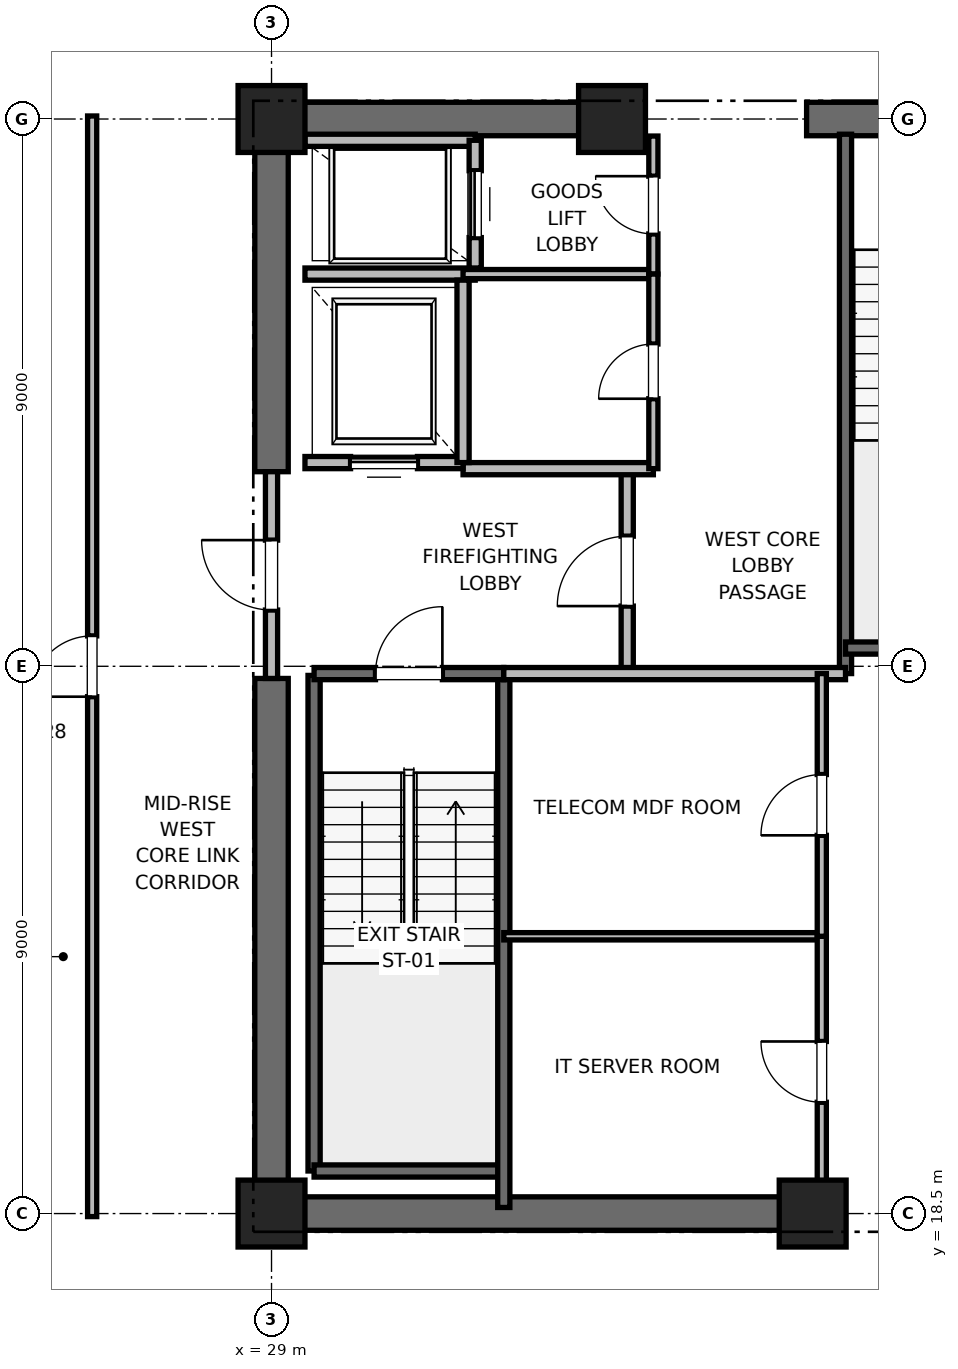
"""IFC4 building model, lengths in metres.
Left out: names, types, materials, properties, quantities, classifications, styles, units other than length and angle.
Written with IfcOpenShell. Run it as: python <this file> out.ifc"""

import sys

from ifc_helpers import new_model, si_unit, direction, frame, frame_2d, origin, origin_2d, place, context, subcontext, project, spatial, rectangle, extrude, element, fill, save


model = new_model("IFC4")
c1 = context("Model", 3, precision=1e-05, world=origin(), true_north=direction((0.0, 1.0)))
c2 = subcontext(c1, "Body", "Model", "MODEL_VIEW")
j1 = project(units=[si_unit("LENGTHUNIT", "METRE"), si_unit("PLANEANGLEUNIT", "RADIAN")], contexts=[c1])
p1 = place(None, origin())
s1 = spatial("IfcSite", under=j1, at=p1, CompositionType="ELEMENT")
p2 = place(p1, origin())
s2 = spatial("IfcBuilding", under=s1, at=p2, CompositionType="ELEMENT")
p3 = place(p2, frame((0.0, 0.0, 144.4)))
s3 = spatial("IfcBuildingStorey", under=s2, at=p3, CompositionType="ELEMENT", Elevation=144.4)
for number, where, z_axis, x_axis in (
    (1, (29.0, 18.5, 0.0), (0.0, 0.0, 1.0), (1.0, 0.0, 0.0)),
    (2, (29.0, 36.5, 0.0), (0.0, 0.0, 1.0), (1.0, 0.0, 0.0)),
    (3, (37.9, 18.5, 0.0), (0.0, 0.0, 1.0), (1.0, 0.0, 0.0)),
    (4, (34.6, 36.5, 0.0), (0.0, 0.0, 1.0), (1.0, 0.0, 0.0)),
):
    element("IfcColumn", number, at=place(p3, frame(where, z_axis=z_axis, x_axis=x_axis)), inside=s3, PredefinedType="PILASTER", context=c2, shape_type="SweptSolid", body=[
        extrude(rectangle(XDim=1.1, YDim=1.1, at=origin_2d()), origin(), (0.0, 0.0, 1.0), 4.0),
    ])
p4 = place(p3, frame((29.0, 18.5, 0.0), z_axis=(0.0, 0.0, 1.0), x_axis=(1.0, 0.0, 0.0)))
e5 = element("IfcWall", 5, at=p4, inside=s3, PredefinedType="SHEAR", context=c2, shape_type="SweptSolid", body=[
    extrude(rectangle(XDim=9.2, YDim=0.55, at=frame_2d((4.6, 0.0))), origin(), (0.0, 0.0, 1.0), 3.775),
])
p5 = place(p3, frame((29.0, 36.5, 0.0), z_axis=(0.0, 0.0, 1.0), x_axis=(1.0, 0.0, 0.0)))
e6 = element("IfcWall", 6, at=p5, inside=s3, PredefinedType="SHEAR", context=c2, shape_type="SweptSolid", body=[
    extrude(rectangle(XDim=5.8, YDim=0.55, at=frame_2d((2.9, 0.0))), origin(), (0.0, 0.0, 1.0), 3.775),
])
p6 = place(p3, frame((37.8, 36.5, 0.0), z_axis=(0.0, 0.0, 1.0), x_axis=(1.0, 0.0, 0.0)))
e7 = element("IfcWall", 7, at=p6, inside=s3, PredefinedType="SHEAR", context=c2, shape_type="SweptSolid", body=[
    extrude(rectangle(XDim=4.4, YDim=0.55, at=frame_2d((2.2, 0.0))), origin(), (0.0, 0.0, 1.0), 3.775),
])
p7 = place(p6, frame((1.65, 0.0, 0.0)))
e8 = element("IfcOpeningElement", 8, at=p7, cuts=e7, PredefinedType="OPENING", context=c2, shape_type="SweptSolid", body=[
    extrude(rectangle(XDim=1.1, YDim=2.15, at=frame_2d((0.55, 1.075))), frame((0.0, 0.275, 0.0), z_axis=(0.0, -1.0, 0.0), x_axis=(1.0, 0.0, 0.0)), (0.0, 0.0, 1.0), 0.55),
])
p8 = place(p3, frame((29.0, 18.5, 0.0), z_axis=(0.0, 0.0, 1.0), x_axis=(0.0, 1.0, 0.0)))
e9 = element("IfcWall", 9, at=p8, inside=s3, PredefinedType="SHEAR", context=c2, shape_type="SweptSolid", body=[
    extrude(rectangle(XDim=8.8, YDim=0.55, at=frame_2d((4.4, 0.0))), origin(), (0.0, 0.0, 1.0), 3.775),
])
p9 = place(p3, frame((29.0, 30.7, 0.0), z_axis=(0.0, 0.0, 1.0), x_axis=(0.0, 1.0, 0.0)))
e10 = element("IfcWall", 10, at=p9, inside=s3, PredefinedType="SHEAR", context=c2, shape_type="SweptSolid", body=[
    extrude(rectangle(XDim=5.8, YDim=0.55, at=frame_2d((2.9, 0.0))), origin(), (0.0, 0.0, 1.0), 3.775),
])
p10 = place(p3, frame((29.7, 19.2, 0.0), z_axis=(0.0, 0.0, 1.0), x_axis=(0.0, 1.0, 0.0)))
e11 = element("IfcWall", 11, at=p10, inside=s3, PredefinedType="SOLIDWALL", context=c2, shape_type="SweptSolid", body=[
    extrude(rectangle(XDim=8.15, YDim=0.2, at=frame_2d((4.075, 0.0))), origin(), (0.0, 0.0, 1.0), 3.775),
])
p11 = place(p3, frame((29.7, 19.2, 0.0), z_axis=(0.0, 0.0, 1.0), x_axis=(1.0, 0.0, 0.0)))
e12 = element("IfcWall", 12, at=p11, inside=s3, PredefinedType="SOLIDWALL", context=c2, shape_type="SweptSolid", body=[
    extrude(rectangle(XDim=3.12, YDim=0.2, at=frame_2d((1.56, 0.0))), origin(), (0.0, 0.0, 1.0), 3.775),
])
p12 = place(p3, frame((32.82, 18.6, 0.0), z_axis=(0.0, 0.0, 1.0), x_axis=(0.0, 1.0, 0.0)))
e13 = element("IfcWall", 13, at=p12, inside=s3, PredefinedType="SOLIDWALL", context=c2, shape_type="SweptSolid", body=[
    extrude(rectangle(XDim=8.78, YDim=0.2, at=frame_2d((4.39, 0.0))), origin(), (0.0, 0.0, 1.0), 3.775),
])
p13 = place(p3, frame((29.7, 27.38, 0.0), z_axis=(0.0, 0.0, 1.0), x_axis=(1.0, 0.0, 0.0)))
e14 = element("IfcWall", 14, at=p13, inside=s3, PredefinedType="SOLIDWALL", context=c2, shape_type="SweptSolid", body=[
    extrude(rectangle(XDim=3.12, YDim=0.2, at=frame_2d((1.56, 0.0))), origin(), (0.0, 0.0, 1.0), 3.775),
])
p14 = place(p13, frame((1.01, 0.0, 0.0)))
e15 = element("IfcOpeningElement", 15, at=p14, cuts=e14, PredefinedType="OPENING", context=c2, shape_type="SweptSolid", body=[
    extrude(rectangle(XDim=1.1, YDim=2.15, at=frame_2d((0.55, 1.075))), frame((0.0, 0.1, 0.0), z_axis=(0.0, -1.0, 0.0), x_axis=(1.0, 0.0, 0.0)), (0.0, 0.0, 1.0), 0.2),
])
p15 = place(p3, frame((38.44, 27.38, 0.0), z_axis=(0.0, 0.0, 1.0), x_axis=(0.0, 1.0, 0.0)))
e16 = element("IfcWall", 16, at=p15, inside=s3, PredefinedType="SOLIDWALL", context=c2, shape_type="SweptSolid", body=[
    extrude(rectangle(XDim=8.87, YDim=0.2, at=frame_2d((4.435, 0.0))), origin(), (0.0, 0.0, 1.0), 3.775),
])
p16 = place(p3, frame((38.44, 27.8, 0.0), z_axis=(0.0, 0.0, 1.0), x_axis=(1.0, 0.0, 0.0)))
e17 = element("IfcWall", 17, at=p16, inside=s3, PredefinedType="SOLIDWALL", context=c2, shape_type="SweptSolid", body=[
    extrude(rectangle(XDim=3.32, YDim=0.2, at=frame_2d((1.66, 0.0))), origin(), (0.0, 0.0, 1.0), 3.775),
])
p17 = place(p3, frame((34.85, 27.38, 0.0), z_axis=(0.0, 0.0, 1.0), x_axis=(0.0, 1.0, 0.0)))
e18 = element("IfcWall", 18, at=p17, inside=s3, PredefinedType="PARTITIONING", context=c2, shape_type="SweptSolid", body=[
    extrude(rectangle(XDim=3.37, YDim=0.2, at=frame_2d((1.685, 0.0))), origin(), (0.0, 0.0, 1.0), 3.775),
])
p18 = place(p17, frame((1.11, 0.0, 0.0)))
e19 = element("IfcOpeningElement", 19, at=p18, cuts=e18, PredefinedType="OPENING", context=c2, shape_type="SweptSolid", body=[
    extrude(rectangle(XDim=1.15, YDim=2.2, at=frame_2d((0.575, 1.1))), frame((0.0, 0.1, 0.0), z_axis=(0.0, -1.0, 0.0), x_axis=(1.0, 0.0, 0.0)), (0.0, 0.0, 1.0), 0.2),
])
p19 = place(p3, frame((29.0, 27.3, 0.0), z_axis=(0.0, 0.0, 1.0), x_axis=(0.0, 1.0, 0.0)))
e20 = element("IfcWall", 20, at=p19, inside=s3, PredefinedType="PARTITIONING", context=c2, shape_type="SweptSolid", body=[
    extrude(rectangle(XDim=3.4, YDim=0.2, at=frame_2d((1.7, 0.0))), origin(), (0.0, 0.0, 1.0), 2.755),
])
p20 = place(p19, frame((1.125, 0.0, 0.0)))
e21 = element("IfcOpeningElement", 21, at=p20, cuts=e20, PredefinedType="OPENING", context=c2, shape_type="SweptSolid", body=[
    extrude(rectangle(XDim=1.15, YDim=2.2, at=frame_2d((0.575, 1.1))), frame((0.0, 0.1, 0.0), z_axis=(0.0, -1.0, 0.0), x_axis=(1.0, 0.0, 0.0)), (0.0, 0.0, 1.0), 0.2),
])
p21 = place(p3, frame((32.82, 27.38, 0.0), z_axis=(0.0, 0.0, 1.0), x_axis=(1.0, 0.0, 0.0)))
e22 = element("IfcWall", 22, at=p21, inside=s3, PredefinedType="PARTITIONING", context=c2, shape_type="SweptSolid", body=[
    extrude(rectangle(XDim=5.62, YDim=0.2, at=frame_2d((2.81, 0.0))), origin(), (0.0, 0.0, 1.0), 3.775),
])
p22 = place(p3, frame((32.15, 30.75, 0.0), z_axis=(0.0, 0.0, 1.0), x_axis=(1.0, 0.0, 0.0)))
e23 = element("IfcWall", 23, at=p22, inside=s3, PredefinedType="PARTITIONING", context=c2, shape_type="SweptSolid", body=[
    extrude(rectangle(XDim=3.13, YDim=0.2, at=frame_2d((1.565, 0.0))), origin(), (0.0, 0.0, 1.0), 3.775),
])
p23 = place(p3, frame((29.55, 30.85, 0.0), z_axis=(0.0, 0.0, 1.0), x_axis=(1.0, 0.0, 0.0)))
e24 = element("IfcWall", 24, at=p23, inside=s3, PredefinedType="SOLIDWALL", context=c2, shape_type="SweptSolid", body=[
    extrude(rectangle(XDim=2.6, YDim=0.2, at=frame_2d((1.3, 0.0))), origin(), (0.0, 0.0, 1.0), 2.755),
])
p24 = place(p23, frame((0.75, 0.0, 0.0)))
e25 = element("IfcOpeningElement", 25, at=p24, cuts=e24, PredefinedType="OPENING", context=c2, shape_type="SweptSolid", body=[
    extrude(rectangle(XDim=1.1, YDim=2.2, at=frame_2d((0.55, 1.1))), frame((0.0, 0.1, 0.0), z_axis=(0.0, -1.0, 0.0), x_axis=(1.0, 0.0, 0.0)), (0.0, 0.0, 1.0), 0.2),
])
p25 = place(p3, frame((29.55, 33.95, 0.0), z_axis=(0.0, 0.0, 1.0), x_axis=(1.0, 0.0, 0.0)))
e26 = element("IfcWall", 26, at=p25, inside=s3, PredefinedType="SOLIDWALL", context=c2, shape_type="SweptSolid", body=[
    extrude(rectangle(XDim=2.8, YDim=0.2, at=frame_2d((1.4, 0.0))), origin(), (0.0, 0.0, 1.0), 3.775),
])
p26 = place(p3, frame((32.15, 30.85, 0.0), z_axis=(0.0, 0.0, 1.0), x_axis=(0.0, 1.0, 0.0)))
e27 = element("IfcWall", 27, at=p26, inside=s3, PredefinedType="SOLIDWALL", context=c2, shape_type="SweptSolid", body=[
    extrude(rectangle(XDim=3.0, YDim=0.2, at=frame_2d((1.5, 0.0))), origin(), (0.0, 0.0, 1.0), 3.775),
])
p27 = place(p3, frame((32.35, 36.15, 0.0), z_axis=(0.0, 0.0, 1.0), x_axis=(-1.0, 0.0, 0.0)))
e28 = element("IfcWall", 28, at=p27, inside=s3, PredefinedType="SOLIDWALL", context=c2, shape_type="SweptSolid", body=[
    extrude(rectangle(XDim=2.8, YDim=0.2, at=frame_2d((1.4, 0.0))), origin(), (0.0, 0.0, 1.0), 2.985),
])
p28 = place(p3, frame((32.35, 34.05, 0.0), z_axis=(0.0, 0.0, 1.0), x_axis=(0.0, 1.0, 0.0)))
e29 = element("IfcWall", 29, at=p28, inside=s3, PredefinedType="SOLIDWALL", context=c2, shape_type="SweptSolid", body=[
    extrude(rectangle(XDim=2.1, YDim=0.2, at=frame_2d((1.05, 0.0))), origin(), (0.0, 0.0, 1.0), 3.775),
])
p29 = place(p28, frame((0.5, 0.0, 0.0)))
e30 = element("IfcOpeningElement", 30, at=p29, cuts=e29, PredefinedType="OPENING", context=c2, shape_type="SweptSolid", body=[
    extrude(rectangle(XDim=1.1, YDim=2.2, at=frame_2d((0.55, 1.1))), frame((0.0, 0.1, 0.0), z_axis=(0.0, -1.0, 0.0), x_axis=(1.0, 0.0, 0.0)), (0.0, 0.0, 1.0), 0.2),
])
p30 = place(p3, frame((32.15, 33.95, 0.0), z_axis=(0.0, 0.0, 1.0), x_axis=(1.0, 0.0, 0.0)))
e31 = element("IfcWall", 31, at=p30, inside=s3, PredefinedType="PARTITIONING", context=c2, shape_type="SweptSolid", body=[
    extrude(rectangle(XDim=3.13, YDim=0.15, at=frame_2d((1.565, 0.0))), origin(), (0.0, 0.0, 1.0), 2.85),
])
p31 = place(p3, frame((35.28, 33.95, 0.0), z_axis=(0.0, 0.0, 1.0), x_axis=(0.0, 1.0, 0.0)))
e32 = element("IfcWall", 32, at=p31, inside=s3, PredefinedType="PARTITIONING", context=c2, shape_type="SweptSolid", body=[
    extrude(rectangle(XDim=2.27, YDim=0.15, at=frame_2d((1.135, 0.0))), origin(), (0.0, 0.0, 1.0), 2.755),
])
p32 = place(p31, frame((0.66, 0.0, 0.0)))
e33 = element("IfcOpeningElement", 33, at=p32, cuts=e32, PredefinedType="OPENING", context=c2, shape_type="SweptSolid", body=[
    extrude(rectangle(XDim=0.95, YDim=2.15, at=frame_2d((0.475, 1.075))), frame((0.0, 0.075, 0.0), z_axis=(0.0, -1.0, 0.0), x_axis=(1.0, 0.0, 0.0)), (0.0, 0.0, 1.0), 0.15),
])
p33 = place(p3, frame((35.28, 30.75, 0.0), z_axis=(0.0, 0.0, 1.0), x_axis=(0.0, 1.0, 0.0)))
e34 = element("IfcWall", 34, at=p33, inside=s3, PredefinedType="PARTITIONING", context=c2, shape_type="SweptSolid", body=[
    extrude(rectangle(XDim=3.2, YDim=0.15, at=frame_2d((1.6, 0.0))), origin(), (0.0, 0.0, 1.0), 2.85),
])
p34 = place(p33, frame((1.15, 0.0, 0.0)))
e35 = element("IfcOpeningElement", 35, at=p34, cuts=e34, PredefinedType="OPENING", context=c2, shape_type="SweptSolid", body=[
    extrude(rectangle(XDim=0.9, YDim=2.1, at=frame_2d((0.45, 1.05))), frame((0.0, 0.075, 0.0), z_axis=(0.0, -1.0, 0.0), x_axis=(1.0, 0.0, 0.0)), (0.0, 0.0, 1.0), 0.15),
])
p35 = place(p3, frame((32.82, 23.06, 0.0), z_axis=(0.0, 0.0, 1.0), x_axis=(1.0, 0.0, 0.0)))
e36 = element("IfcWall", 36, at=p35, inside=s3, PredefinedType="PARTITIONING", context=c2, shape_type="SweptSolid", body=[
    extrude(rectangle(XDim=5.23, YDim=0.12, at=frame_2d((2.615, 0.0))), origin(), (0.0, 0.0, 1.0), 2.85),
])
p36 = place(p3, frame((38.05, 18.6, 0.0), z_axis=(0.0, 0.0, 1.0), x_axis=(0.0, 1.0, 0.0)))
e37 = element("IfcWall", 37, at=p36, inside=s3, PredefinedType="PARTITIONING", context=c2, shape_type="SweptSolid", body=[
    extrude(rectangle(XDim=4.46, YDim=0.15, at=frame_2d((2.23, 0.0))), origin(), (0.0, 0.0, 1.0), 2.755),
])
p37 = place(p36, frame((1.73, 0.0, 0.0)))
e38 = element("IfcOpeningElement", 38, at=p37, cuts=e37, PredefinedType="OPENING", context=c2, shape_type="SweptSolid", body=[
    extrude(rectangle(XDim=1.0, YDim=2.15, at=frame_2d((0.5, 1.075))), frame((0.0, 0.075, 0.0), z_axis=(0.0, -1.0, 0.0), x_axis=(1.0, 0.0, 0.0)), (0.0, 0.0, 1.0), 0.15),
])
p38 = place(p3, frame((38.05, 23.06, 0.0), z_axis=(0.0, 0.0, 1.0), x_axis=(0.0, 1.0, 0.0)))
e39 = element("IfcWall", 39, at=p38, inside=s3, PredefinedType="PARTITIONING", context=c2, shape_type="SweptSolid", body=[
    extrude(rectangle(XDim=4.32, YDim=0.15, at=frame_2d((2.16, 0.0))), origin(), (0.0, 0.0, 1.0), 2.85),
])
p39 = place(p38, frame((1.66, 0.0, 0.0)))
e40 = element("IfcOpeningElement", 40, at=p39, cuts=e39, PredefinedType="OPENING", context=c2, shape_type="SweptSolid", body=[
    extrude(rectangle(XDim=1.0, YDim=2.15, at=frame_2d((0.5, 1.075))), frame((0.0, 0.075, 0.0), z_axis=(0.0, -1.0, 0.0), x_axis=(1.0, 0.0, 0.0)), (0.0, 0.0, 1.0), 0.15),
])
p40 = place(p3, frame((26.05, 18.45, 0.0), z_axis=(0.0, 0.0, 1.0), x_axis=(0.0, 1.0, 0.0)))
e41 = element("IfcWall", 41, at=p40, inside=s3, PredefinedType="PARTITIONING", context=c2, shape_type="SweptSolid", body=[
    extrude(rectangle(XDim=18.1, YDim=0.15, at=frame_2d((9.05, 0.0))), origin(), (0.0, 0.0, 1.0), 2.85),
])
p41 = place(p40, frame((8.55, 0.0, 0.0)))
e42 = element("IfcOpeningElement", 42, at=p41, cuts=e41, PredefinedType="OPENING", context=c2, shape_type="SweptSolid", body=[
    extrude(rectangle(XDim=1.0, YDim=2.15, at=frame_2d((0.5, 1.075))), frame((0.0, 0.075, 0.0), z_axis=(0.0, -1.0, 0.0), x_axis=(1.0, 0.0, 0.0)), (0.0, 0.0, 1.0), 0.15),
])
p42 = place(p14, origin())
e43 = element("IfcDoor", 43, at=p42, inside=s3, OperationType="SINGLE_SWING_RIGHT", PredefinedType="DOOR", context=c2, shape_type="SweptSolid", body=[
    extrude(rectangle(XDim=1.1, YDim=2.15, at=frame_2d((0.55, 1.075))), frame((0.0, 0.025, 0.0), z_axis=(0.0, -1.0, 0.0), x_axis=(1.0, 0.0, 0.0)), (0.0, 0.0, 1.0), 0.05),
])
fill(e15, e43)
p43 = place(p18, origin())
e44 = element("IfcDoor", 44, at=p43, inside=s3, OperationType="SINGLE_SWING_LEFT", PredefinedType="DOOR", context=c2, shape_type="SweptSolid", body=[
    extrude(rectangle(XDim=1.15, YDim=2.2, at=frame_2d((0.575, 1.1))), frame((0.0, 0.025, 0.0), z_axis=(0.0, -1.0, 0.0), x_axis=(1.0, 0.0, 0.0)), (0.0, 0.0, 1.0), 0.05),
])
fill(e19, e44)
p44 = place(p20, origin())
e45 = element("IfcDoor", 45, at=p44, inside=s3, OperationType="SINGLE_SWING_RIGHT", PredefinedType="DOOR", context=c2, shape_type="SweptSolid", body=[
    extrude(rectangle(XDim=1.15, YDim=2.2, at=frame_2d((0.575, 1.1))), frame((0.0, 0.025, 0.0), z_axis=(0.0, -1.0, 0.0), x_axis=(1.0, 0.0, 0.0)), (0.0, 0.0, 1.0), 0.05),
])
fill(e21, e45)
p45 = place(p24, origin())
e46 = element("IfcDoor", 46, at=p45, inside=s3, OperationType="SLIDING_TO_RIGHT", PredefinedType="DOOR", context=c2, shape_type="SweptSolid", body=[
    extrude(rectangle(XDim=1.1, YDim=2.2, at=frame_2d((0.55, 1.1))), frame((0.0, 0.025, 0.0), z_axis=(0.0, -1.0, 0.0), x_axis=(1.0, 0.0, 0.0)), (0.0, 0.0, 1.0), 0.05),
])
fill(e25, e46)
p46 = place(p29, origin())
e47 = element("IfcDoor", 47, at=p46, inside=s3, OperationType="SLIDING_TO_RIGHT", PredefinedType="DOOR", context=c2, shape_type="SweptSolid", body=[
    extrude(rectangle(XDim=1.1, YDim=2.2, at=frame_2d((0.55, 1.1))), frame((0.0, 0.025, 0.0), z_axis=(0.0, -1.0, 0.0), x_axis=(1.0, 0.0, 0.0)), (0.0, 0.0, 1.0), 0.05),
])
fill(e30, e47)
p47 = place(p32, origin())
e48 = element("IfcDoor", 48, at=p47, inside=s3, OperationType="SINGLE_SWING_RIGHT", PredefinedType="DOOR", context=c2, shape_type="SweptSolid", body=[
    extrude(rectangle(XDim=0.95, YDim=2.15, at=frame_2d((0.475, 1.075))), frame((0.0, 0.025, 0.0), z_axis=(0.0, -1.0, 0.0), x_axis=(1.0, 0.0, 0.0)), (0.0, 0.0, 1.0), 0.05),
])
fill(e33, e48)
p48 = place(p34, origin())
e49 = element("IfcDoor", 49, at=p48, inside=s3, OperationType="SINGLE_SWING_LEFT", PredefinedType="DOOR", context=c2, shape_type="SweptSolid", body=[
    extrude(rectangle(XDim=0.9, YDim=2.1, at=frame_2d((0.45, 1.05))), frame((0.0, 0.025, 0.0), z_axis=(0.0, -1.0, 0.0), x_axis=(1.0, 0.0, 0.0)), (0.0, 0.0, 1.0), 0.05),
])
fill(e35, e49)
p49 = place(p37, origin())
e50 = element("IfcDoor", 50, at=p49, inside=s3, OperationType="SINGLE_SWING_RIGHT", PredefinedType="DOOR", context=c2, shape_type="SweptSolid", body=[
    extrude(rectangle(XDim=1.0, YDim=2.15, at=frame_2d((0.5, 1.075))), frame((0.0, 0.025, 0.0), z_axis=(0.0, -1.0, 0.0), x_axis=(1.0, 0.0, 0.0)), (0.0, 0.0, 1.0), 0.05),
])
fill(e38, e50)
p50 = place(p39, origin())
e51 = element("IfcDoor", 51, at=p50, inside=s3, OperationType="SINGLE_SWING_LEFT", PredefinedType="DOOR", context=c2, shape_type="SweptSolid", body=[
    extrude(rectangle(XDim=1.0, YDim=2.15, at=frame_2d((0.5, 1.075))), frame((0.0, 0.025, 0.0), z_axis=(0.0, -1.0, 0.0), x_axis=(1.0, 0.0, 0.0)), (0.0, 0.0, 1.0), 0.05),
])
fill(e40, e51)
p51 = place(p41, origin())
e52 = element("IfcDoor", 52, at=p51, inside=s3, OperationType="SINGLE_SWING_LEFT", PredefinedType="DOOR", context=c2, shape_type="SweptSolid", body=[
    extrude(rectangle(XDim=1.0, YDim=2.15, at=frame_2d((0.5, 1.075))), frame((0.0, 0.025, 0.0), z_axis=(0.0, -1.0, 0.0), x_axis=(1.0, 0.0, 0.0)), (0.0, 0.0, 1.0), 0.05),
])
fill(e42, e52)
save(model, sys.argv[1])
